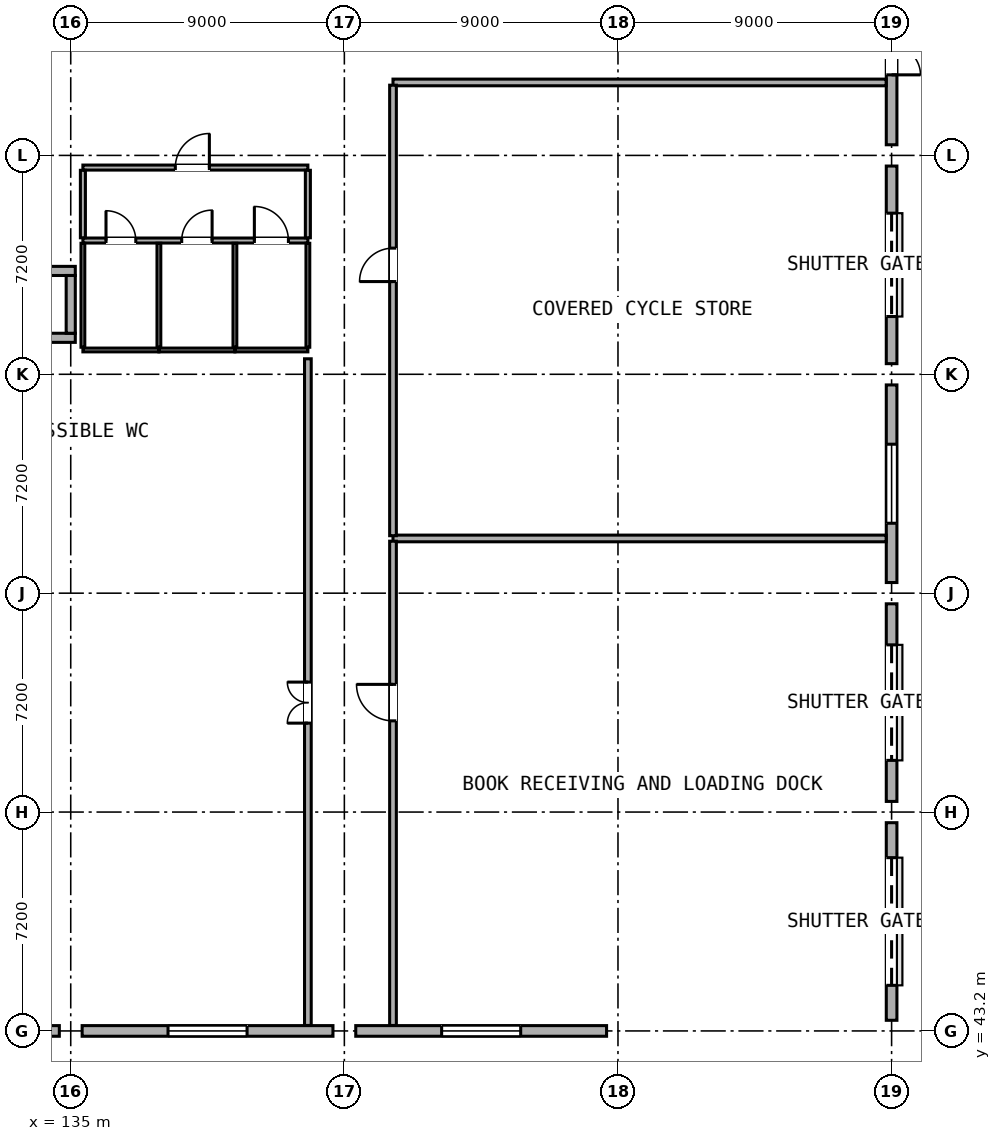
"""IFC4 building model, lengths in metres.
Left out: names, types, materials, properties, quantities, classifications, styles, units other than length and angle.
Written with IfcOpenShell. Run it as: python <this file> out.ifc"""

import sys

from ifc_helpers import new_model, si_unit, direction, frame, frame_2d, origin, origin_2d, place, context, subcontext, project, spatial, rectangle, hollow_rectangle, extrude, element, fill, save


model = new_model("IFC4")
c1 = context("Model", 3, precision=1e-05, world=origin(), true_north=direction((0.0, 1.0)))
c2 = subcontext(c1, "Body", "Model", "MODEL_VIEW")
j1 = project(units=[si_unit("LENGTHUNIT", "METRE"), si_unit("PLANEANGLEUNIT", "RADIAN")], contexts=[c1])
p1 = place(None, origin())
s1 = spatial("IfcSite", under=j1, at=p1, CompositionType="ELEMENT")
p2 = place(p1, origin())
s2 = spatial("IfcBuilding", under=s1, at=p2, CompositionType="ELEMENT")
p3 = place(p2, origin())
s3 = spatial("IfcBuildingStorey", under=s2, at=p3, CompositionType="ELEMENT", Elevation=0.0)
for number, where, z_axis, x_axis in (
    (1, (135.0, 43.2, 0.0), (0.0, 0.0, 1.0), (1.0, 0.0, 0.0)),
    (2, (135.0, 50.4, 0.0), (0.0, 0.0, 1.0), (1.0, 0.0, 0.0)),
    (3, (135.0, 57.6, 0.0), (0.0, 0.0, 1.0), (1.0, 0.0, 0.0)),
    (4, (135.0, 64.8, 0.0), (0.0, 0.0, 1.0), (1.0, 0.0, 0.0)),
    (5, (135.0, 72.0, 0.0), (0.0, 0.0, 1.0), (1.0, 0.0, 0.0)),
    (6, (144.0, 43.2, 0.0), (0.0, 0.0, 1.0), (1.0, 0.0, 0.0)),
    (7, (144.0, 50.4, 0.0), (0.0, 0.0, 1.0), (1.0, 0.0, 0.0)),
    (8, (144.0, 57.6, 0.0), (0.0, 0.0, 1.0), (1.0, 0.0, 0.0)),
    (9, (144.0, 64.8, 0.0), (0.0, 0.0, 1.0), (1.0, 0.0, 0.0)),
    (10, (144.0, 72.0, 0.0), (0.0, 0.0, 1.0), (1.0, 0.0, 0.0)),
    (11, (153.0, 43.2, 0.0), (0.0, 0.0, 1.0), (1.0, 0.0, 0.0)),
    (12, (153.0, 50.4, 0.0), (0.0, 0.0, 1.0), (1.0, 0.0, 0.0)),
    (13, (153.0, 57.6, 0.0), (0.0, 0.0, 1.0), (1.0, 0.0, 0.0)),
    (14, (153.0, 64.8, 0.0), (0.0, 0.0, 1.0), (1.0, 0.0, 0.0)),
    (15, (153.0, 72.0, 0.0), (0.0, 0.0, 1.0), (1.0, 0.0, 0.0)),
):
    element("IfcColumn", number, at=place(p3, frame(where, z_axis=z_axis, x_axis=x_axis)), inside=s3, PredefinedType="COLUMN", context=c2, shape_type="SweptSolid", body=[
        extrude(hollow_rectangle(XDim=0.75, YDim=0.75, WallThickness=0.032, at=origin_2d()), origin(), (0.0, 0.0, 1.0), 4.8),
    ])
for number, where, z_axis, x_axis in (
    (16, (162.0, 43.2, 0.0), (0.0, 0.0, 1.0), (1.0, 0.0, 0.0)),
    (17, (162.0, 50.4, 0.0), (0.0, 0.0, 1.0), (1.0, 0.0, 0.0)),
    (18, (162.0, 57.6, 0.0), (0.0, 0.0, 1.0), (1.0, 0.0, 0.0)),
    (19, (162.0, 64.8, 0.0), (0.0, 0.0, 1.0), (1.0, 0.0, 0.0)),
    (20, (162.0, 72.0, 0.0), (0.0, 0.0, 1.0), (1.0, 0.0, 0.0)),
):
    element("IfcColumn", number, at=place(p3, frame(where, z_axis=z_axis, x_axis=x_axis)), inside=s3, PredefinedType="COLUMN", context=c2, shape_type="SweptSolid", body=[
        extrude(hollow_rectangle(XDim=0.7, YDim=0.7, WallThickness=0.028, at=origin_2d()), origin(), (0.0, 0.0, 1.0), 4.8),
    ])
p4 = place(p3, frame((126.375, 43.2, 0.0), z_axis=(0.0, 0.0, 1.0), x_axis=(1.0, 0.0, 0.0)))
e21 = element("IfcWall", 21, at=p4, inside=s3, PredefinedType="STANDARD", context=c2, shape_type="SweptSolid", body=[
    extrude(rectangle(XDim=8.25, YDim=0.35, at=frame_2d((4.125, 0.0))), origin(), (0.0, 0.0, 1.0), 4.055),
])
p5 = place(p4, frame((3.025, 0.0, 0.0)))
e22 = element("IfcOpeningElement", 22, at=p5, cuts=e21, PredefinedType="OPENING", context=c2, shape_type="SweptSolid", body=[
    extrude(rectangle(XDim=2.2, YDim=2.5, at=frame_2d((1.1, 1.25))), frame((0.0, 0.187, 0.0), z_axis=(0.0, -1.0, 0.0), x_axis=(1.0, 0.0, 0.0)), (0.0, 0.0, 1.0), 0.374),
])
p6 = place(p3, frame((135.375, 43.2, 0.0), z_axis=(0.0, 0.0, 1.0), x_axis=(1.0, 0.0, 0.0)))
e23 = element("IfcWall", 23, at=p6, inside=s3, PredefinedType="STANDARD", context=c2, shape_type="SweptSolid", body=[
    extrude(rectangle(XDim=8.25, YDim=0.35, at=frame_2d((4.125, 0.0))), origin(), (0.0, 0.0, 1.0), 4.055),
])
p7 = place(p6, frame((2.825, 0.0, 0.85)))
e24 = element("IfcOpeningElement", 24, at=p7, cuts=e23, PredefinedType="OPENING", context=c2, shape_type="SweptSolid", body=[
    extrude(rectangle(XDim=2.6, YDim=1.6, at=frame_2d((1.3, 0.8))), frame((0.0, 0.187, 0.0), z_axis=(0.0, -1.0, 0.0), x_axis=(1.0, 0.0, 0.0)), (0.0, 0.0, 1.0), 0.374),
])
p8 = place(p3, frame((144.375, 43.2, 0.0), z_axis=(0.0, 0.0, 1.0), x_axis=(1.0, 0.0, 0.0)))
e25 = element("IfcWall", 25, at=p8, inside=s3, PredefinedType="STANDARD", context=c2, shape_type="SweptSolid", body=[
    extrude(rectangle(XDim=8.25, YDim=0.35, at=frame_2d((4.125, 0.0))), origin(), (0.0, 0.0, 1.0), 4.055),
])
p9 = place(p8, frame((2.825, 0.0, 0.85)))
e26 = element("IfcOpeningElement", 26, at=p9, cuts=e25, PredefinedType="OPENING", context=c2, shape_type="SweptSolid", body=[
    extrude(rectangle(XDim=2.6, YDim=1.6, at=frame_2d((1.3, 0.8))), frame((0.0, 0.187, 0.0), z_axis=(0.0, -1.0, 0.0), x_axis=(1.0, 0.0, 0.0)), (0.0, 0.0, 1.0), 0.374),
])
p10 = place(p3, frame((162.0, 50.05, 0.0), z_axis=(0.0, 0.0, 1.0), x_axis=(0.0, -1.0, 0.0)))
e27 = element("IfcWall", 27, at=p10, inside=s3, PredefinedType="STANDARD", context=c2, shape_type="SweptSolid", body=[
    extrude(rectangle(XDim=6.5, YDim=0.35, at=frame_2d((3.25, 0.0))), origin(), (0.0, 0.0, 1.0), 4.055),
])
p11 = place(p10, frame((1.15, 0.0, 0.0)))
e28 = element("IfcOpeningElement", 28, at=p11, cuts=e27, PredefinedType="OPENING", context=c2, shape_type="SweptSolid", body=[
    extrude(rectangle(XDim=4.2, YDim=3.4, at=frame_2d((2.1, 1.7))), frame((0.0, 0.187, 0.0), z_axis=(0.0, -1.0, 0.0), x_axis=(1.0, 0.0, 0.0)), (0.0, 0.0, 1.0), 0.374),
])
p12 = place(p3, frame((162.0, 57.25, 0.0), z_axis=(0.0, 0.0, 1.0), x_axis=(0.0, -1.0, 0.0)))
e29 = element("IfcWall", 29, at=p12, inside=s3, PredefinedType="STANDARD", context=c2, shape_type="SweptSolid", body=[
    extrude(rectangle(XDim=6.5, YDim=0.35, at=frame_2d((3.25, 0.0))), origin(), (0.0, 0.0, 1.0), 4.055),
])
p13 = place(p12, frame((1.35, 0.0, 0.0)))
e30 = element("IfcOpeningElement", 30, at=p13, cuts=e29, PredefinedType="OPENING", context=c2, shape_type="SweptSolid", body=[
    extrude(rectangle(XDim=3.8, YDim=3.25, at=frame_2d((1.9, 1.625))), frame((0.0, 0.187, 0.0), z_axis=(0.0, -1.0, 0.0), x_axis=(1.0, 0.0, 0.0)), (0.0, 0.0, 1.0), 0.374),
])
p14 = place(p3, frame((162.0, 64.45, 0.0), z_axis=(0.0, 0.0, 1.0), x_axis=(0.0, -1.0, 0.0)))
e31 = element("IfcWall", 31, at=p14, inside=s3, PredefinedType="STANDARD", context=c2, shape_type="SweptSolid", body=[
    extrude(rectangle(XDim=6.5, YDim=0.35, at=frame_2d((3.25, 0.0))), origin(), (0.0, 0.0, 1.0), 4.055),
])
p15 = place(p14, frame((1.95, 0.0, 0.85)))
e32 = element("IfcOpeningElement", 32, at=p15, cuts=e31, PredefinedType="OPENING", context=c2, shape_type="SweptSolid", body=[
    extrude(rectangle(XDim=2.6, YDim=1.6, at=frame_2d((1.3, 0.8))), frame((0.0, 0.187, 0.0), z_axis=(0.0, -1.0, 0.0), x_axis=(1.0, 0.0, 0.0)), (0.0, 0.0, 1.0), 0.374),
])
p16 = place(p3, frame((162.0, 71.65, 0.0), z_axis=(0.0, 0.0, 1.0), x_axis=(0.0, -1.0, 0.0)))
e33 = element("IfcWall", 33, at=p16, inside=s3, PredefinedType="STANDARD", context=c2, shape_type="SweptSolid", body=[
    extrude(rectangle(XDim=6.5, YDim=0.35, at=frame_2d((3.25, 0.0))), origin(), (0.0, 0.0, 1.0), 4.055),
])
p17 = place(p16, frame((1.55, 0.0, 0.0)))
e34 = element("IfcOpeningElement", 34, at=p17, cuts=e33, PredefinedType="OPENING", context=c2, shape_type="SweptSolid", body=[
    extrude(rectangle(XDim=3.4, YDim=3.0, at=frame_2d((1.7, 1.5))), frame((0.0, 0.187, 0.0), z_axis=(0.0, -1.0, 0.0), x_axis=(1.0, 0.0, 0.0)), (0.0, 0.0, 1.0), 0.374),
])
p18 = place(p3, frame((162.0, 78.85, 0.0), z_axis=(0.0, 0.0, 1.0), x_axis=(0.0, -1.0, 0.0)))
e35 = element("IfcWall", 35, at=p18, inside=s3, PredefinedType="STANDARD", context=c2, shape_type="SweptSolid", body=[
    extrude(rectangle(XDim=6.5, YDim=0.35, at=frame_2d((3.25, 0.0))), origin(), (0.0, 0.0, 1.0), 4.055),
])
p19 = place(p18, frame((2.3, 0.0, 0.0)))
e36 = element("IfcOpeningElement", 36, at=p19, cuts=e35, PredefinedType="OPENING", context=c2, shape_type="SweptSolid", body=[
    extrude(rectangle(XDim=1.9, YDim=2.4, at=frame_2d((0.95, 1.2))), frame((0.0, 0.187, 0.0), z_axis=(0.0, -1.0, 0.0), x_axis=(1.0, 0.0, 0.0)), (0.0, 0.0, 1.0), 0.374),
])
for number, where, z_axis, x_axis in (
    (37, (133.05, 66.0, 0.0), (0.0, 0.0, 1.0), (1.0, 0.0, 0.0)),
    (38, (133.05, 68.2, 0.0), (0.0, 0.0, 1.0), (1.0, 0.0, 0.0)),
):
    element("IfcWall", number, at=place(p3, frame(where, z_axis=z_axis, x_axis=x_axis)), inside=s3, PredefinedType="SHEAR", context=c2, shape_type="SweptSolid", body=[
        extrude(rectangle(XDim=2.1, YDim=0.3, at=frame_2d((1.05, 0.0))), origin(), (0.0, 0.0, 1.0), 4.555),
    ])
p20 = place(p3, frame((135.0, 66.15, 0.0), z_axis=(0.0, 0.0, 1.0), x_axis=(0.0, 1.0, 0.0)))
e39 = element("IfcWall", 39, at=p20, inside=s3, PredefinedType="SHEAR", context=c2, shape_type="SweptSolid", body=[
    extrude(rectangle(XDim=1.9, YDim=0.3, at=frame_2d((0.95, 0.0))), origin(), (0.0, 0.0, 1.0), 4.555),
])
p21 = place(p3, frame((135.4, 69.2, 0.0), z_axis=(0.0, 0.0, 1.0), x_axis=(1.0, 0.0, 0.0)))
e40 = element("IfcWall", 40, at=p21, inside=s3, PredefinedType="PARTITIONING", context=c2, shape_type="SweptSolid", body=[
    extrude(rectangle(XDim=7.4, YDim=0.165, at=frame_2d((3.7, 0.0))), origin(), (0.0, 0.0, 1.0), 4.555),
])
p22 = place(p21, frame((0.76, 0.0, 0.0)))
e41 = element("IfcOpeningElement", 41, at=p22, cuts=e40, PredefinedType="OPENING", context=c2, shape_type="SweptSolid", body=[
    extrude(rectangle(XDim=0.98, YDim=2.02, at=frame_2d((0.49, 1.01))), frame((0.0, 0.094, 0.0), z_axis=(0.0, -1.0, 0.0), x_axis=(1.0, 0.0, 0.0)), (0.0, 0.0, 1.0), 0.189),
])
p23 = place(p21, frame((3.25, 0.0, 0.0)))
e42 = element("IfcOpeningElement", 42, at=p23, cuts=e40, PredefinedType="OPENING", context=c2, shape_type="SweptSolid", body=[
    extrude(rectangle(XDim=1.0, YDim=2.08, at=frame_2d((0.5, 1.04))), frame((0.0, 0.094, 0.0), z_axis=(0.0, -1.0, 0.0), x_axis=(1.0, 0.0, 0.0)), (0.0, 0.0, 1.0), 0.189),
])
p24 = place(p21, frame((5.64, 0.0, 0.0)))
e43 = element("IfcOpeningElement", 43, at=p24, cuts=e40, PredefinedType="OPENING", context=c2, shape_type="SweptSolid", body=[
    extrude(rectangle(XDim=1.12, YDim=2.08, at=frame_2d((0.56, 1.04))), frame((0.0, 0.094, 0.0), z_axis=(0.0, -1.0, 0.0), x_axis=(1.0, 0.0, 0.0)), (0.0, 0.0, 1.0), 0.189),
])
p25 = place(p3, frame((135.4, 71.6, 0.0), z_axis=(0.0, 0.0, 1.0), x_axis=(1.0, 0.0, 0.0)))
e44 = element("IfcWall", 44, at=p25, inside=s3, PredefinedType="PARTITIONING", context=c2, shape_type="SweptSolid", body=[
    extrude(rectangle(XDim=7.4, YDim=0.165, at=frame_2d((3.7, 0.0))), origin(), (0.0, 0.0, 1.0), 4.555),
])
p26 = place(p25, frame((3.04, 0.0, 0.0)))
e45 = element("IfcOpeningElement", 45, at=p26, cuts=e44, PredefinedType="OPENING", context=c2, shape_type="SweptSolid", body=[
    extrude(rectangle(XDim=1.12, YDim=2.08, at=frame_2d((0.56, 1.04))), frame((0.0, 0.094, 0.0), z_axis=(0.0, -1.0, 0.0), x_axis=(1.0, 0.0, 0.0)), (0.0, 0.0, 1.0), 0.189),
])
for number, where, z_axis, x_axis in (
    (46, (135.4, 69.29, 0.0), (0.0, 0.0, 1.0), (0.0, 1.0, 0.0)),
    (47, (142.8, 69.29, 0.0), (0.0, 0.0, 1.0), (0.0, 1.0, 0.0)),
):
    element("IfcWall", number, at=place(p3, frame(where, z_axis=z_axis, x_axis=x_axis)), inside=s3, PredefinedType="PARTITIONING", context=c2, shape_type="SweptSolid", body=[
        extrude(rectangle(XDim=2.22, YDim=0.165, at=frame_2d((1.11, 0.0))), origin(), (0.0, 0.0, 1.0), 4.555),
    ])
p27 = place(p3, frame((135.4, 65.6, 0.0), z_axis=(0.0, 0.0, 1.0), x_axis=(1.0, 0.0, 0.0)))
e48 = element("IfcWall", 48, at=p27, inside=s3, PredefinedType="PARTITIONING", context=c2, shape_type="SweptSolid", body=[
    extrude(rectangle(XDim=2.5, YDim=0.125, at=frame_2d((1.25, 0.0))), origin(), (0.0, 0.0, 1.0), 4.555),
])
for number, where, z_axis, x_axis in (
    (49, (135.4, 65.69, 0.0), (0.0, 0.0, 1.0), (0.0, 1.0, 0.0)),
    (50, (137.9, 65.69, 0.0), (0.0, 0.0, 1.0), (0.0, 1.0, 0.0)),
):
    element("IfcWall", number, at=place(p3, frame(where, z_axis=z_axis, x_axis=x_axis)), inside=s3, PredefinedType="PARTITIONING", context=c2, shape_type="SweptSolid", body=[
        extrude(rectangle(XDim=3.42, YDim=0.125, at=frame_2d((1.71, 0.0))), origin(), (0.0, 0.0, 1.0), 4.555),
    ])
p28 = place(p3, frame((137.9, 65.6, 0.0), z_axis=(0.0, 0.0, 1.0), x_axis=(1.0, 0.0, 0.0)))
e51 = element("IfcWall", 51, at=p28, inside=s3, PredefinedType="PARTITIONING", context=c2, shape_type="SweptSolid", body=[
    extrude(rectangle(XDim=2.5, YDim=0.125, at=frame_2d((1.25, 0.0))), origin(), (0.0, 0.0, 1.0), 4.555),
])
p29 = place(p3, frame((140.4, 65.69, 0.0), z_axis=(0.0, 0.0, 1.0), x_axis=(0.0, 1.0, 0.0)))
e52 = element("IfcWall", 52, at=p29, inside=s3, PredefinedType="PARTITIONING", context=c2, shape_type="SweptSolid", body=[
    extrude(rectangle(XDim=3.42, YDim=0.125, at=frame_2d((1.71, 0.0))), origin(), (0.0, 0.0, 1.0), 4.555),
])
p30 = place(p3, frame((140.4, 65.6, 0.0), z_axis=(0.0, 0.0, 1.0), x_axis=(1.0, 0.0, 0.0)))
e53 = element("IfcWall", 53, at=p30, inside=s3, PredefinedType="PARTITIONING", context=c2, shape_type="SweptSolid", body=[
    extrude(rectangle(XDim=2.4, YDim=0.125, at=frame_2d((1.2, 0.0))), origin(), (0.0, 0.0, 1.0), 4.555),
])
p31 = place(p3, frame((142.8, 65.69, 0.0), z_axis=(0.0, 0.0, 1.0), x_axis=(0.0, 1.0, 0.0)))
e54 = element("IfcWall", 54, at=p31, inside=s3, PredefinedType="PARTITIONING", context=c2, shape_type="SweptSolid", body=[
    extrude(rectangle(XDim=3.42, YDim=0.125, at=frame_2d((1.71, 0.0))), origin(), (0.0, 0.0, 1.0), 4.555),
])
p32 = place(p3, frame((142.8, 43.38, 0.0), z_axis=(0.0, 0.0, 1.0), x_axis=(0.0, 1.0, 0.0)))
e55 = element("IfcWall", 55, at=p32, inside=s3, PredefinedType="PARTITIONING", context=c2, shape_type="SweptSolid", body=[
    extrude(rectangle(XDim=21.93, YDim=0.22, at=frame_2d((10.965, 0.0))), origin(), (0.0, 0.0, 1.0), 4.555),
])
p33 = place(p32, frame((9.945, 0.0, 0.0)))
e56 = element("IfcOpeningElement", 56, at=p33, cuts=e55, PredefinedType="OPENING", context=c2, shape_type="SweptSolid", body=[
    extrude(rectangle(XDim=1.35, YDim=2.08, at=frame_2d((0.675, 1.04))), frame((0.0, 0.122, 0.0), z_axis=(0.0, -1.0, 0.0), x_axis=(1.0, 0.0, 0.0)), (0.0, 0.0, 1.0), 0.244),
])
p34 = place(p3, frame((145.6, 59.4, 0.0), z_axis=(0.0, 0.0, 1.0), x_axis=(1.0, 0.0, 0.0)))
e57 = element("IfcWall", 57, at=p34, inside=s3, PredefinedType="PARTITIONING", context=c2, shape_type="SweptSolid", body=[
    extrude(rectangle(XDim=16.22, YDim=0.22, at=frame_2d((8.11, 0.0))), origin(), (0.0, 0.0, 1.0), 4.555),
])
p35 = place(p3, frame((145.6, 43.38, 0.0), z_axis=(0.0, 0.0, 1.0), x_axis=(0.0, 1.0, 0.0)))
e58 = element("IfcWall", 58, at=p35, inside=s3, PredefinedType="PARTITIONING", context=c2, shape_type="SweptSolid", body=[
    extrude(rectangle(XDim=15.93, YDim=0.22, at=frame_2d((7.965, 0.0))), origin(), (0.0, 0.0, 1.0), 4.555),
])
p36 = place(p35, frame((10.02, 0.0, 0.0)))
e59 = element("IfcOpeningElement", 59, at=p36, cuts=e58, PredefinedType="OPENING", context=c2, shape_type="SweptSolid", body=[
    extrude(rectangle(XDim=1.2, YDim=2.1, at=frame_2d((0.6, 1.05))), frame((0.0, 0.122, 0.0), z_axis=(0.0, -1.0, 0.0), x_axis=(1.0, 0.0, 0.0)), (0.0, 0.0, 1.0), 0.244),
])
p37 = place(p3, frame((145.6, 74.4, 0.0), z_axis=(0.0, 0.0, 1.0), x_axis=(1.0, 0.0, 0.0)))
e60 = element("IfcWall", 60, at=p37, inside=s3, PredefinedType="PARTITIONING", context=c2, shape_type="SweptSolid", body=[
    extrude(rectangle(XDim=16.22, YDim=0.22, at=frame_2d((8.11, 0.0))), origin(), (0.0, 0.0, 1.0), 4.555),
])
p38 = place(p3, frame((145.6, 59.49, 0.0), z_axis=(0.0, 0.0, 1.0), x_axis=(0.0, 1.0, 0.0)))
e61 = element("IfcWall", 61, at=p38, inside=s3, PredefinedType="PARTITIONING", context=c2, shape_type="SweptSolid", body=[
    extrude(rectangle(XDim=14.82, YDim=0.22, at=frame_2d((7.41, 0.0))), origin(), (0.0, 0.0, 1.0), 4.555),
])
p39 = place(p38, frame((8.36, 0.0, 0.0)))
e62 = element("IfcOpeningElement", 62, at=p39, cuts=e61, PredefinedType="OPENING", context=c2, shape_type="SweptSolid", body=[
    extrude(rectangle(XDim=1.1, YDim=2.08, at=frame_2d((0.55, 1.04))), frame((0.0, 0.122, 0.0), z_axis=(0.0, -1.0, 0.0), x_axis=(1.0, 0.0, 0.0)), (0.0, 0.0, 1.0), 0.244),
])
p40 = place(p7, origin())
e63 = element("IfcWindow", 63, at=p40, inside=s3, PartitioningType="DOUBLE_PANEL_VERTICAL", PredefinedType="WINDOW", context=c2, shape_type="SweptSolid", body=[
    extrude(rectangle(XDim=2.6, YDim=1.6, at=frame_2d((1.3, 0.8))), frame((0.0, 0.03, 0.0), z_axis=(0.0, -1.0, 0.0), x_axis=(1.0, 0.0, 0.0)), (0.0, 0.0, 1.0), 0.06),
])
fill(e24, e63)
p41 = place(p9, origin())
e64 = element("IfcWindow", 64, at=p41, inside=s3, PartitioningType="DOUBLE_PANEL_VERTICAL", PredefinedType="WINDOW", context=c2, shape_type="SweptSolid", body=[
    extrude(rectangle(XDim=2.6, YDim=1.6, at=frame_2d((1.3, 0.8))), frame((0.0, 0.03, 0.0), z_axis=(0.0, -1.0, 0.0), x_axis=(1.0, 0.0, 0.0)), (0.0, 0.0, 1.0), 0.06),
])
fill(e26, e64)
p42 = place(p11, origin())
e65 = element("IfcDoor", 65, at=p42, inside=s3, OperationType="ROLLINGUP", PredefinedType="GATE", context=c2, shape_type="SweptSolid", body=[
    extrude(rectangle(XDim=4.2, YDim=3.4, at=frame_2d((2.1, 1.7))), frame((0.0, 0.025, 0.0), z_axis=(0.0, -1.0, 0.0), x_axis=(1.0, 0.0, 0.0)), (0.0, 0.0, 1.0), 0.05),
])
fill(e28, e65)
p43 = place(p13, origin())
e66 = element("IfcDoor", 66, at=p43, inside=s3, OperationType="ROLLINGUP", PredefinedType="GATE", context=c2, shape_type="SweptSolid", body=[
    extrude(rectangle(XDim=3.8, YDim=3.25, at=frame_2d((1.9, 1.625))), frame((0.0, 0.025, 0.0), z_axis=(0.0, -1.0, 0.0), x_axis=(1.0, 0.0, 0.0)), (0.0, 0.0, 1.0), 0.05),
])
fill(e30, e66)
p44 = place(p15, origin())
e67 = element("IfcWindow", 67, at=p44, inside=s3, PartitioningType="DOUBLE_PANEL_VERTICAL", PredefinedType="WINDOW", context=c2, shape_type="SweptSolid", body=[
    extrude(rectangle(XDim=2.6, YDim=1.6, at=frame_2d((1.3, 0.8))), frame((0.0, 0.03, 0.0), z_axis=(0.0, -1.0, 0.0), x_axis=(1.0, 0.0, 0.0)), (0.0, 0.0, 1.0), 0.06),
])
fill(e32, e67)
p45 = place(p17, origin())
e68 = element("IfcDoor", 68, at=p45, inside=s3, OperationType="ROLLINGUP", PredefinedType="GATE", context=c2, shape_type="SweptSolid", body=[
    extrude(rectangle(XDim=3.4, YDim=3.0, at=frame_2d((1.7, 1.5))), frame((0.0, 0.025, 0.0), z_axis=(0.0, -1.0, 0.0), x_axis=(1.0, 0.0, 0.0)), (0.0, 0.0, 1.0), 0.05),
])
fill(e34, e68)
p46 = place(p19, origin())
e69 = element("IfcDoor", 69, at=p46, inside=s3, OperationType="DOUBLE_DOOR_SINGLE_SWING", PredefinedType="DOOR", context=c2, shape_type="SweptSolid", body=[
    extrude(rectangle(XDim=1.9, YDim=2.4, at=frame_2d((0.95, 1.2))), frame((0.0, 0.025, 0.0), z_axis=(0.0, -1.0, 0.0), x_axis=(1.0, 0.0, 0.0)), (0.0, 0.0, 1.0), 0.05),
])
fill(e36, e69)
p47 = place(p26, origin())
e70 = element("IfcDoor", 70, at=p47, inside=s3, OperationType="SINGLE_SWING_RIGHT", PredefinedType="DOOR", context=c2, shape_type="SweptSolid", body=[
    extrude(rectangle(XDim=1.12, YDim=2.08, at=frame_2d((0.56, 1.04))), frame((0.0, 0.025, 0.0), z_axis=(0.0, -1.0, 0.0), x_axis=(1.0, 0.0, 0.0)), (0.0, 0.0, 1.0), 0.05),
])
fill(e45, e70)
p48 = place(p22, origin())
e71 = element("IfcDoor", 71, at=p48, inside=s3, OperationType="SINGLE_SWING_LEFT", PredefinedType="DOOR", context=c2, shape_type="SweptSolid", body=[
    extrude(rectangle(XDim=0.98, YDim=2.02, at=frame_2d((0.49, 1.01))), frame((0.0, 0.025, 0.0), z_axis=(0.0, -1.0, 0.0), x_axis=(1.0, 0.0, 0.0)), (0.0, 0.0, 1.0), 0.05),
])
fill(e41, e71)
p49 = place(p23, origin())
e72 = element("IfcDoor", 72, at=p49, inside=s3, OperationType="SINGLE_SWING_RIGHT", PredefinedType="DOOR", context=c2, shape_type="SweptSolid", body=[
    extrude(rectangle(XDim=1.0, YDim=2.08, at=frame_2d((0.5, 1.04))), frame((0.0, 0.025, 0.0), z_axis=(0.0, -1.0, 0.0), x_axis=(1.0, 0.0, 0.0)), (0.0, 0.0, 1.0), 0.05),
])
fill(e42, e72)
p50 = place(p24, origin())
e73 = element("IfcDoor", 73, at=p50, inside=s3, OperationType="SINGLE_SWING_LEFT", PredefinedType="DOOR", context=c2, shape_type="SweptSolid", body=[
    extrude(rectangle(XDim=1.12, YDim=2.08, at=frame_2d((0.56, 1.04))), frame((0.0, 0.025, 0.0), z_axis=(0.0, -1.0, 0.0), x_axis=(1.0, 0.0, 0.0)), (0.0, 0.0, 1.0), 0.05),
])
fill(e43, e73)
p51 = place(p33, origin())
e74 = element("IfcDoor", 74, at=p51, inside=s3, OperationType="DOUBLE_DOOR_SINGLE_SWING", PredefinedType="DOOR", context=c2, shape_type="SweptSolid", body=[
    extrude(rectangle(XDim=1.35, YDim=2.08, at=frame_2d((0.675, 1.04))), frame((0.0, 0.025, 0.0), z_axis=(0.0, -1.0, 0.0), x_axis=(1.0, 0.0, 0.0)), (0.0, 0.0, 1.0), 0.05),
])
fill(e56, e74)
p52 = place(p36, origin())
e75 = element("IfcDoor", 75, at=p52, inside=s3, OperationType="SINGLE_SWING_RIGHT", PredefinedType="DOOR", context=c2, shape_type="SweptSolid", body=[
    extrude(rectangle(XDim=1.2, YDim=2.1, at=frame_2d((0.6, 1.05))), frame((0.0, 0.025, 0.0), z_axis=(0.0, -1.0, 0.0), x_axis=(1.0, 0.0, 0.0)), (0.0, 0.0, 1.0), 0.05),
])
fill(e59, e75)
p53 = place(p39, origin())
e76 = element("IfcDoor", 76, at=p53, inside=s3, OperationType="SINGLE_SWING_LEFT", PredefinedType="DOOR", context=c2, shape_type="SweptSolid", body=[
    extrude(rectangle(XDim=1.1, YDim=2.08, at=frame_2d((0.55, 1.04))), frame((0.0, 0.025, 0.0), z_axis=(0.0, -1.0, 0.0), x_axis=(1.0, 0.0, 0.0)), (0.0, 0.0, 1.0), 0.05),
])
fill(e62, e76)
save(model, sys.argv[1])
